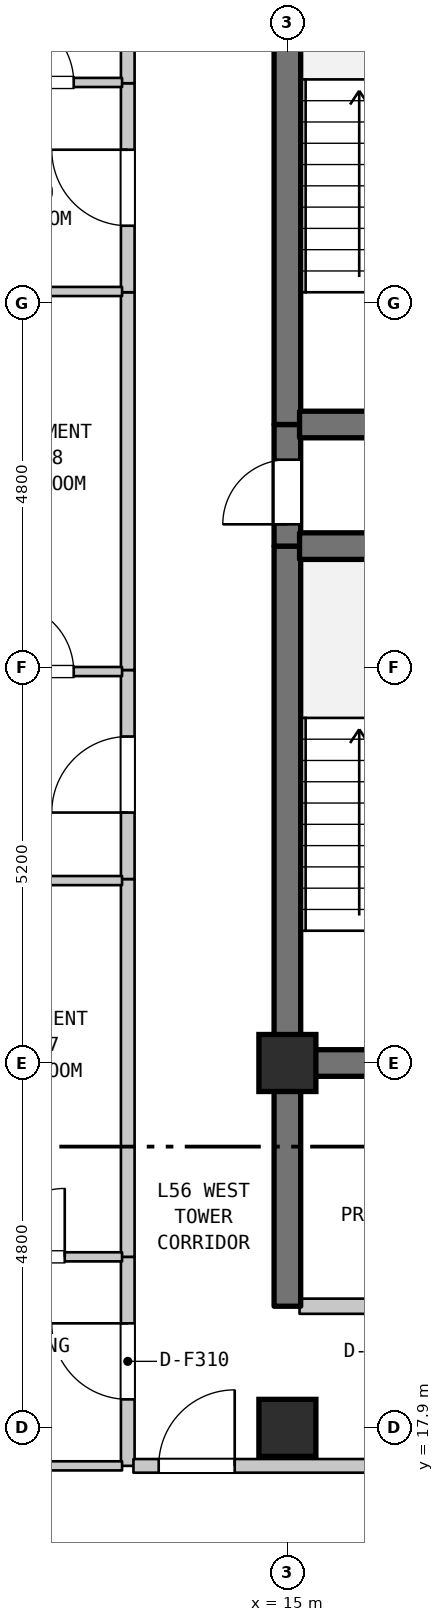
"""IFC4 building model, lengths in metres.
Left out: names, types, materials, properties, quantities, classifications, styles, units other than length and angle.
Written with IfcOpenShell. Run it as: python <this file> out.ifc"""

import sys

from ifc_helpers import new_model, si_unit, direction, frame, frame_2d, origin, origin_2d, place, context, subcontext, project, spatial, rectangle, extrude, element, fill, save


model = new_model("IFC4")
c1 = context("Model", 3, precision=1e-05, world=origin(), true_north=direction((0.0, 1.0)))
c2 = subcontext(c1, "Body", "Model", "MODEL_VIEW")
j1 = project(units=[si_unit("LENGTHUNIT", "METRE"), si_unit("PLANEANGLEUNIT", "RADIAN")], contexts=[c1])
p1 = place(None, origin())
s1 = spatial("IfcSite", under=j1, at=p1, CompositionType="ELEMENT")
p2 = place(p1, origin())
s2 = spatial("IfcBuilding", under=s1, at=p2, CompositionType="ELEMENT")
p3 = place(p2, frame((0.0, 0.0, 226.5)))
s3 = spatial("IfcBuildingStorey", under=s2, at=p3, CompositionType="ELEMENT", Elevation=226.5)
for number, where, z_axis, x_axis in (
    (1, (15.0, 17.9, 0.0), (0.0, 0.0, 1.0), (1.0, 0.0, 0.0)),
    (2, (15.0, 22.7, 0.0), (0.0, 0.0, 1.0), (1.0, 0.0, 0.0)),
):
    element("IfcColumn", number, at=place(p3, frame(where, z_axis=z_axis, x_axis=x_axis)), inside=s3, PredefinedType="COLUMN", context=c2, shape_type="SweptSolid", body=[
        extrude(rectangle(XDim=0.75, YDim=0.75, at=origin_2d()), origin(), (0.0, 0.0, 1.0), 3.7),
    ])
p4 = place(p3, frame((12.9, 17.4, 0.0), z_axis=(0.0, 0.0, 1.0), x_axis=(0.0, 1.0, 0.0)))
e3 = element("IfcWall", 3, at=p4, inside=s3, PredefinedType="STANDARD", context=c2, shape_type="SweptSolid", body=[
    extrude(rectangle(XDim=2.75, YDim=0.18, at=frame_2d((1.375, 0.0))), origin(), (0.0, 0.0, 1.0), 3.39),
])
p5 = place(p4, frame((0.875, 0.0, 0.0)))
e4 = element("IfcOpeningElement", 4, at=p5, cuts=e3, PredefinedType="OPENING", context=c2, shape_type="SweptSolid", body=[
    extrude(rectangle(XDim=1.0, YDim=2.15, at=frame_2d((0.5, 1.075))), frame((0.0, 0.1, 0.0), z_axis=(0.0, -1.0, 0.0), x_axis=(1.0, 0.0, 0.0)), (0.0, 0.0, 1.0), 0.2),
])
p6 = place(p3, frame((12.9, 20.15, 0.0), z_axis=(0.0, 0.0, 1.0), x_axis=(0.0, 1.0, 0.0)))
e5 = element("IfcWall", 5, at=p6, inside=s3, PredefinedType="STANDARD", context=c2, shape_type="SweptSolid", body=[
    extrude(rectangle(XDim=4.97, YDim=0.18, at=frame_2d((2.485, 0.0))), origin(), (0.0, 0.0, 1.0), 3.39),
])
p7 = place(p3, frame((12.9, 25.12, 0.0), z_axis=(0.0, 0.0, 1.0), x_axis=(0.0, 1.0, 0.0)))
e6 = element("IfcWall", 6, at=p7, inside=s3, PredefinedType="STANDARD", context=c2, shape_type="SweptSolid", body=[
    extrude(rectangle(XDim=2.75, YDim=0.18, at=frame_2d((1.375, 0.0))), origin(), (0.0, 0.0, 1.0), 3.39),
])
p8 = place(p7, frame((0.875, 0.0, 0.0)))
e7 = element("IfcOpeningElement", 7, at=p8, cuts=e6, PredefinedType="OPENING", context=c2, shape_type="SweptSolid", body=[
    extrude(rectangle(XDim=1.0, YDim=2.15, at=frame_2d((0.5, 1.075))), frame((0.0, 0.1, 0.0), z_axis=(0.0, -1.0, 0.0), x_axis=(1.0, 0.0, 0.0)), (0.0, 0.0, 1.0), 0.2),
])
p9 = place(p3, frame((12.9, 27.87, 0.0), z_axis=(0.0, 0.0, 1.0), x_axis=(0.0, 1.0, 0.0)))
e8 = element("IfcWall", 8, at=p9, inside=s3, PredefinedType="STANDARD", context=c2, shape_type="SweptSolid", body=[
    extrude(rectangle(XDim=4.97, YDim=0.18, at=frame_2d((2.485, 0.0))), origin(), (0.0, 0.0, 1.0), 3.39),
])
p10 = place(p3, frame((12.9, 32.84, 0.0), z_axis=(0.0, 0.0, 1.0), x_axis=(0.0, 1.0, 0.0)))
e9 = element("IfcWall", 9, at=p10, inside=s3, PredefinedType="STANDARD", context=c2, shape_type="SweptSolid", body=[
    extrude(rectangle(XDim=2.75, YDim=0.18, at=frame_2d((1.375, 0.0))), origin(), (0.0, 0.0, 1.0), 3.39),
])
p11 = place(p10, frame((0.875, 0.0, 0.0)))
e10 = element("IfcOpeningElement", 10, at=p11, cuts=e9, PredefinedType="OPENING", context=c2, shape_type="SweptSolid", body=[
    extrude(rectangle(XDim=1.0, YDim=2.15, at=frame_2d((0.5, 1.075))), frame((0.0, 0.1, 0.0), z_axis=(0.0, -1.0, 0.0), x_axis=(1.0, 0.0, 0.0)), (0.0, 0.0, 1.0), 0.2),
])
p12 = place(p3, frame((12.9, 35.59, 0.0), z_axis=(0.0, 0.0, 1.0), x_axis=(0.0, 1.0, 0.0)))
e11 = element("IfcWall", 11, at=p12, inside=s3, PredefinedType="STANDARD", context=c2, shape_type="SweptSolid", body=[
    extrude(rectangle(XDim=4.51, YDim=0.18, at=frame_2d((2.255, 0.0))), origin(), (0.0, 0.0, 1.0), 3.39),
])
p13 = place(p3, frame((15.0, 19.5, 0.0), z_axis=(0.0, 0.0, 1.0), x_axis=(0.0, 1.0, 0.0)))
e12 = element("IfcWall", 12, at=p13, inside=s3, PredefinedType="SHEAR", context=c2, shape_type="SweptSolid", body=[
    extrude(rectangle(XDim=3.2, YDim=0.35, at=frame_2d((1.6, 0.0))), origin(), (0.0, 0.0, 1.0), 3.39),
])
p14 = place(p3, frame((15.0, 22.7, 0.0), z_axis=(0.0, 0.0, 1.0), x_axis=(0.0, 1.0, 0.0)))
e13 = element("IfcWall", 13, at=p14, inside=s3, PredefinedType="SHEAR", context=c2, shape_type="SweptSolid", body=[
    extrude(rectangle(XDim=6.8, YDim=0.35, at=frame_2d((3.4, 0.0))), origin(), (0.0, 0.0, 1.0), 3.39),
])
p15 = place(p3, frame((15.0, 29.5, 0.0), z_axis=(0.0, 0.0, 1.0), x_axis=(0.0, 1.0, 0.0)))
e14 = element("IfcWall", 14, at=p15, inside=s3, PredefinedType="SHEAR", context=c2, shape_type="SweptSolid", body=[
    extrude(rectangle(XDim=1.6, YDim=0.35, at=frame_2d((0.8, 0.0))), origin(), (0.0, 0.0, 1.0), 3.39),
])
p16 = place(p15, frame((0.287, 0.0, 0.0)))
e15 = element("IfcOpeningElement", 15, at=p16, cuts=e14, PredefinedType="OPENING", context=c2, shape_type="SweptSolid", body=[
    extrude(rectangle(XDim=0.85, YDim=2.1, at=frame_2d((0.425, 1.05))), frame((0.0, 0.185, 0.0), z_axis=(0.0, -1.0, 0.0), x_axis=(1.0, 0.0, 0.0)), (0.0, 0.0, 1.0), 0.37),
])
p17 = place(p3, frame((15.0, 31.1, 0.0), z_axis=(0.0, 0.0, 1.0), x_axis=(0.0, 1.0, 0.0)))
e16 = element("IfcWall", 16, at=p17, inside=s3, PredefinedType="SHEAR", context=c2, shape_type="SweptSolid", body=[
    extrude(rectangle(XDim=6.8, YDim=0.35, at=frame_2d((3.4, 0.0))), origin(), (0.0, 0.0, 1.0), 3.39),
])
p18 = place(p3, frame((8.973, 17.4, 0.0), z_axis=(0.0, 0.0, 1.0), x_axis=(1.0, 0.0, 0.0)))
e17 = element("IfcWall", 17, at=p18, inside=s3, PredefinedType="PARTITIONING", context=c2, shape_type="SweptSolid", body=[
    extrude(rectangle(XDim=3.852, YDim=0.12, at=frame_2d((1.926, 0.0))), origin(), (0.0, 0.0, 1.0), 3.39),
])
p19 = place(p3, frame((12.975, 17.4, 0.0), z_axis=(0.0, 0.0, 1.0), x_axis=(1.0, 0.0, 0.0)))
e18 = element("IfcWall", 18, at=p19, inside=s3, PredefinedType="STANDARD", context=c2, shape_type="SweptSolid", body=[
    extrude(rectangle(XDim=3.18, YDim=0.18, at=frame_2d((1.59, 0.0))), origin(), (0.0, 0.0, 1.0), 3.39),
])
p20 = place(p19, frame((0.332, 0.0, 0.0)))
e19 = element("IfcOpeningElement", 19, at=p20, cuts=e18, PredefinedType="OPENING", context=c2, shape_type="SweptSolid", body=[
    extrude(rectangle(XDim=1.0, YDim=2.15, at=frame_2d((0.5, 1.075))), frame((0.0, 0.1, 0.0), z_axis=(0.0, -1.0, 0.0), x_axis=(1.0, 0.0, 0.0)), (0.0, 0.0, 1.0), 0.2),
])
p21 = place(p3, frame((15.16, 19.5, 0.0), z_axis=(0.0, 0.0, 1.0), x_axis=(1.0, 0.0, 0.0)))
e20 = element("IfcWall", 20, at=p21, inside=s3, PredefinedType="STANDARD", context=c2, shape_type="SweptSolid", body=[
    extrude(rectangle(XDim=3.68, YDim=0.2, at=frame_2d((1.84, 0.0))), origin(), (0.0, 0.0, 1.0), 3.39),
])
p22 = place(p21, frame((1.39, 0.0, 0.0)))
e21 = element("IfcOpeningElement", 21, at=p22, cuts=e20, PredefinedType="OPENING", context=c2, shape_type="SweptSolid", body=[
    extrude(rectangle(XDim=0.9, YDim=2.15, at=frame_2d((0.45, 1.075))), frame((0.0, 0.11, 0.0), z_axis=(0.0, -1.0, 0.0), x_axis=(1.0, 0.0, 0.0)), (0.0, 0.0, 1.0), 0.22),
])
p23 = place(p3, frame((10.53, 20.15, 0.0), z_axis=(0.0, 0.0, 1.0), x_axis=(1.0, 0.0, 0.0)))
e22 = element("IfcWall", 22, at=p23, inside=s3, PredefinedType="PARTITIONING", context=c2, shape_type="SweptSolid", body=[
    extrude(rectangle(XDim=2.295, YDim=0.12, at=frame_2d((1.147, 0.0))), origin(), (0.0, 0.0, 1.0), 3.39),
])
p24 = place(p23, frame((0.641, 0.0, 0.0)))
e23 = element("IfcOpeningElement", 23, at=p24, cuts=e22, PredefinedType="OPENING", context=c2, shape_type="SweptSolid", body=[
    extrude(rectangle(XDim=0.9, YDim=2.1, at=frame_2d((0.45, 1.05))), frame((0.0, 0.07, 0.0), z_axis=(0.0, -1.0, 0.0), x_axis=(1.0, 0.0, 0.0)), (0.0, 0.0, 1.0), 0.14),
])
p25 = place(p3, frame((15.16, 22.7, 0.0), z_axis=(0.0, 0.0, 1.0), x_axis=(1.0, 0.0, 0.0)))
e24 = element("IfcWall", 24, at=p25, inside=s3, PredefinedType="SHEAR", context=c2, shape_type="SweptSolid", body=[
    extrude(rectangle(XDim=3.68, YDim=0.35, at=frame_2d((1.84, 0.0))), origin(), (0.0, 0.0, 1.0), 3.39),
])
p26 = place(p3, frame((10.53, 25.1, 0.0), z_axis=(0.0, 0.0, 1.0), x_axis=(1.0, 0.0, 0.0)))
e25 = element("IfcWall", 25, at=p26, inside=s3, PredefinedType="PARTITIONING", context=c2, shape_type="SweptSolid", body=[
    extrude(rectangle(XDim=2.295, YDim=0.12, at=frame_2d((1.147, 0.0))), origin(), (0.0, 0.0, 1.0), 3.39),
])
p27 = place(p3, frame((10.623, 27.85, 0.0), z_axis=(0.0, 0.0, 1.0), x_axis=(1.0, 0.0, 0.0)))
e26 = element("IfcWall", 26, at=p27, inside=s3, PredefinedType="PARTITIONING", context=c2, shape_type="SweptSolid", body=[
    extrude(rectangle(XDim=2.202, YDim=0.12, at=frame_2d((1.101, 0.0))), origin(), (0.0, 0.0, 1.0), 3.39),
])
p28 = place(p27, frame((0.666, 0.0, 0.0)))
e27 = element("IfcOpeningElement", 27, at=p28, cuts=e26, PredefinedType="OPENING", context=c2, shape_type="SweptSolid", body=[
    extrude(rectangle(XDim=0.9, YDim=2.1, at=frame_2d((0.45, 1.05))), frame((0.0, 0.07, 0.0), z_axis=(0.0, -1.0, 0.0), x_axis=(1.0, 0.0, 0.0)), (0.0, 0.0, 1.0), 0.14),
])
for number, where, z_axis, x_axis in (
    (28, (15.16, 29.5, 0.0), (0.0, 0.0, 1.0), (1.0, 0.0, 0.0)),
    (29, (15.16, 31.1, 0.0), (0.0, 0.0, 1.0), (1.0, 0.0, 0.0)),
):
    element("IfcWall", number, at=place(p3, frame(where, z_axis=z_axis, x_axis=x_axis)), inside=s3, PredefinedType="SHEAR", context=c2, shape_type="SweptSolid", body=[
        extrude(rectangle(XDim=3.68, YDim=0.35, at=frame_2d((1.84, 0.0))), origin(), (0.0, 0.0, 1.0), 3.39),
    ])
p29 = place(p3, frame((10.623, 32.85, 0.0), z_axis=(0.0, 0.0, 1.0), x_axis=(1.0, 0.0, 0.0)))
e30 = element("IfcWall", 30, at=p29, inside=s3, PredefinedType="PARTITIONING", context=c2, shape_type="SweptSolid", body=[
    extrude(rectangle(XDim=2.202, YDim=0.12, at=frame_2d((1.101, 0.0))), origin(), (0.0, 0.0, 1.0), 3.39),
])
p30 = place(p3, frame((10.623, 35.6, 0.0), z_axis=(0.0, 0.0, 1.0), x_axis=(1.0, 0.0, 0.0)))
e31 = element("IfcWall", 31, at=p30, inside=s3, PredefinedType="PARTITIONING", context=c2, shape_type="SweptSolid", body=[
    extrude(rectangle(XDim=2.202, YDim=0.12, at=frame_2d((1.101, 0.0))), origin(), (0.0, 0.0, 1.0), 3.39),
])
p31 = place(p30, frame((0.666, 0.0, 0.0)))
e32 = element("IfcOpeningElement", 32, at=p31, cuts=e31, PredefinedType="OPENING", context=c2, shape_type="SweptSolid", body=[
    extrude(rectangle(XDim=0.9, YDim=2.1, at=frame_2d((0.45, 1.05))), frame((0.0, 0.07, 0.0), z_axis=(0.0, -1.0, 0.0), x_axis=(1.0, 0.0, 0.0)), (0.0, 0.0, 1.0), 0.14),
])
p32 = place(p5, origin())
e33 = element("IfcDoor", 33, at=p32, inside=s3, OperationType="SINGLE_SWING_RIGHT", PredefinedType="DOOR", context=c2, shape_type="SweptSolid", body=[
    extrude(rectangle(XDim=1.0, YDim=2.15, at=frame_2d((0.5, 1.075))), frame((0.0, 0.025, 0.0), z_axis=(0.0, -1.0, 0.0), x_axis=(1.0, 0.0, 0.0)), (0.0, 0.0, 1.0), 0.05),
])
fill(e4, e33)
p33 = place(p8, origin())
e34 = element("IfcDoor", 34, at=p33, inside=s3, OperationType="SINGLE_SWING_LEFT", PredefinedType="DOOR", context=c2, shape_type="SweptSolid", body=[
    extrude(rectangle(XDim=1.0, YDim=2.15, at=frame_2d((0.5, 1.075))), frame((0.0, 0.025, 0.0), z_axis=(0.0, -1.0, 0.0), x_axis=(1.0, 0.0, 0.0)), (0.0, 0.0, 1.0), 0.05),
])
fill(e7, e34)
p34 = place(p11, origin())
e35 = element("IfcDoor", 35, at=p34, inside=s3, OperationType="SINGLE_SWING_RIGHT", PredefinedType="DOOR", context=c2, shape_type="SweptSolid", body=[
    extrude(rectangle(XDim=1.0, YDim=2.15, at=frame_2d((0.5, 1.075))), frame((0.0, 0.025, 0.0), z_axis=(0.0, -1.0, 0.0), x_axis=(1.0, 0.0, 0.0)), (0.0, 0.0, 1.0), 0.05),
])
fill(e10, e35)
p35 = place(p16, origin())
e36 = element("IfcDoor", 36, at=p35, inside=s3, OperationType="SINGLE_SWING_LEFT", PredefinedType="DOOR", context=c2, shape_type="SweptSolid", body=[
    extrude(rectangle(XDim=0.85, YDim=2.1, at=frame_2d((0.425, 1.05))), frame((0.0, 0.025, 0.0), z_axis=(0.0, -1.0, 0.0), x_axis=(1.0, 0.0, 0.0)), (0.0, 0.0, 1.0), 0.05),
])
fill(e15, e36)
p36 = place(p20, origin())
e37 = element("IfcDoor", 37, at=p36, inside=s3, OperationType="SINGLE_SWING_RIGHT", PredefinedType="DOOR", context=c2, shape_type="SweptSolid", body=[
    extrude(rectangle(XDim=1.0, YDim=2.15, at=frame_2d((0.5, 1.075))), frame((0.0, 0.025, 0.0), z_axis=(0.0, -1.0, 0.0), x_axis=(1.0, 0.0, 0.0)), (0.0, 0.0, 1.0), 0.05),
])
fill(e19, e37)
p37 = place(p24, origin())
e38 = element("IfcDoor", 38, at=p37, inside=s3, OperationType="SINGLE_SWING_RIGHT", PredefinedType="DOOR", context=c2, shape_type="SweptSolid", body=[
    extrude(rectangle(XDim=0.9, YDim=2.1, at=frame_2d((0.45, 1.05))), frame((0.0, 0.025, 0.0), z_axis=(0.0, -1.0, 0.0), x_axis=(1.0, 0.0, 0.0)), (0.0, 0.0, 1.0), 0.05),
])
fill(e23, e38)
p38 = place(p28, origin())
e39 = element("IfcDoor", 39, at=p38, inside=s3, OperationType="SINGLE_SWING_LEFT", PredefinedType="DOOR", context=c2, shape_type="SweptSolid", body=[
    extrude(rectangle(XDim=0.9, YDim=2.1, at=frame_2d((0.45, 1.05))), frame((0.0, 0.025, 0.0), z_axis=(0.0, -1.0, 0.0), x_axis=(1.0, 0.0, 0.0)), (0.0, 0.0, 1.0), 0.05),
])
fill(e27, e39)
p39 = place(p31, origin())
e40 = element("IfcDoor", 40, at=p39, inside=s3, OperationType="SINGLE_SWING_LEFT", PredefinedType="DOOR", context=c2, shape_type="SweptSolid", body=[
    extrude(rectangle(XDim=0.9, YDim=2.1, at=frame_2d((0.45, 1.05))), frame((0.0, 0.025, 0.0), z_axis=(0.0, -1.0, 0.0), x_axis=(1.0, 0.0, 0.0)), (0.0, 0.0, 1.0), 0.05),
])
fill(e32, e40)
save(model, sys.argv[1])
